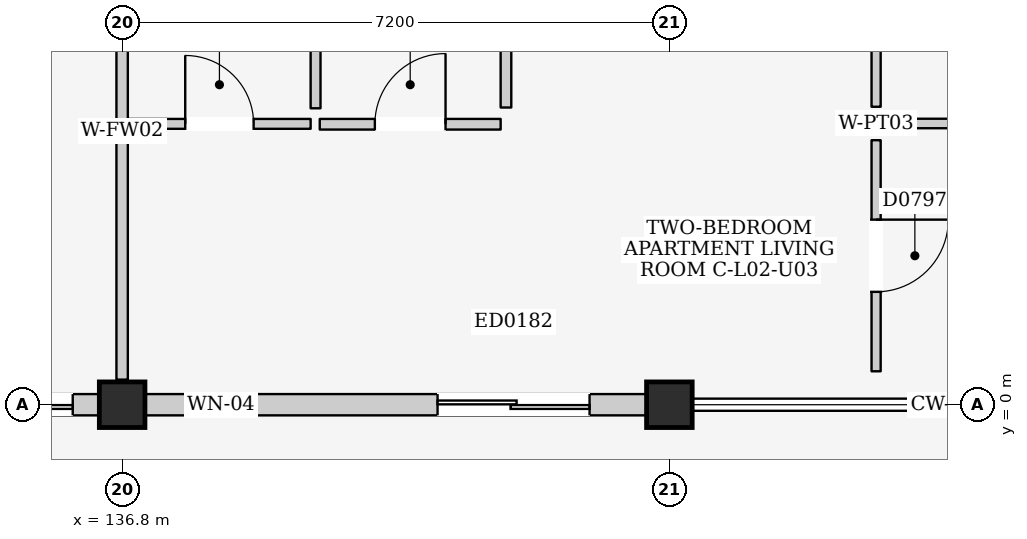
"""IFC4 building model, lengths in metres.
Left out: names, types, materials, properties, quantities, classifications, styles, units other than length and angle.
Written with IfcOpenShell. Run it as: python <this file> out.ifc"""

import sys

from ifc_helpers import new_model, si_unit, direction, frame, frame_2d, origin, origin_2d, place, context, subcontext, project, spatial, rectangle, extrude, element, fill, save


model = new_model("IFC4")
c1 = context("Model", 3, precision=1e-05, world=origin(), true_north=direction((0.0, 1.0)))
c2 = subcontext(c1, "Body", "Model", "MODEL_VIEW")
j1 = project(units=[si_unit("LENGTHUNIT", "METRE"), si_unit("PLANEANGLEUNIT", "RADIAN")], contexts=[c1])
p1 = place(None, origin())
s1 = spatial("IfcSite", under=j1, at=p1, CompositionType="ELEMENT")
p2 = place(p1, origin())
s2 = spatial("IfcBuilding", under=s1, at=p2, CompositionType="ELEMENT")
p3 = place(p2, frame((0.0, 0.0, 9.0)))
s3 = spatial("IfcBuildingStorey", under=s2, at=p3, CompositionType="ELEMENT", Elevation=9.0)
for number, where, z_axis, x_axis in (
    (1, (136.8, 0.0, 0.0), (0.0, 0.0, 1.0), (1.0, 0.0, 0.0)),
    (2, (144.0, 0.0, 0.0), (0.0, 0.0, 1.0), (1.0, 0.0, 0.0)),
):
    element("IfcColumn", number, at=place(p3, frame(where, z_axis=z_axis, x_axis=x_axis)), inside=s3, PredefinedType="COLUMN", context=c2, shape_type="SweptSolid", body=[
        extrude(rectangle(XDim=0.6, YDim=0.6, at=origin_2d()), origin(), (0.0, 0.0, 1.0), 3.2),
    ])
p4 = place(p3, frame((129.9, 0.0, 0.0), z_axis=(0.0, 0.0, 1.0), x_axis=(1.0, 0.0, 0.0)))
e3 = element("IfcWall", 3, at=p4, inside=s3, PredefinedType="ELEMENTEDWALL", context=c2, shape_type="SweptSolid", body=[
    extrude(rectangle(XDim=6.6, YDim=0.28, at=frame_2d((3.3, 0.0))), origin(), (0.0, 0.0, 1.0), 2.425),
])
p5 = place(p4, frame((3.85, 0.0, 0.0)))
e4 = element("IfcOpeningElement", 4, at=p5, cuts=e3, PredefinedType="OPENING", context=c2, shape_type="SweptSolid", body=[
    extrude(rectangle(XDim=2.4, YDim=2.12, at=frame_2d((1.2, 1.06))), frame((0.0, 0.155, 0.0), z_axis=(0.0, -1.0, 0.0), x_axis=(1.0, 0.0, 0.0)), (0.0, 0.0, 1.0), 0.31),
])
p6 = place(p4, frame((0.55, 0.0, 0.9)))
e5 = element("IfcOpeningElement", 5, at=p6, cuts=e3, PredefinedType="OPENING", context=c2, shape_type="SweptSolid", body=[
    extrude(rectangle(XDim=1.2, YDim=1.35, at=frame_2d((0.6, 0.675))), frame((0.0, 0.155, 0.0), z_axis=(0.0, -1.0, 0.0), x_axis=(1.0, 0.0, 0.0)), (0.0, 0.0, 1.0), 0.31),
])
p7 = place(p3, frame((137.1, 0.0, 0.0), z_axis=(0.0, 0.0, 1.0), x_axis=(1.0, 0.0, 0.0)))
e6 = element("IfcWall", 6, at=p7, inside=s3, PredefinedType="ELEMENTEDWALL", context=c2, shape_type="SweptSolid", body=[
    extrude(rectangle(XDim=6.6, YDim=0.28, at=frame_2d((3.3, 0.0))), origin(), (0.0, 0.0, 1.0), 2.425),
])
p8 = place(p7, frame((3.85, 0.0, 0.0)))
e7 = element("IfcOpeningElement", 7, at=p8, cuts=e6, PredefinedType="OPENING", context=c2, shape_type="SweptSolid", body=[
    extrude(rectangle(XDim=2.0, YDim=2.12, at=frame_2d((1.0, 1.06))), frame((0.0, 0.155, 0.0), z_axis=(0.0, -1.0, 0.0), x_axis=(1.0, 0.0, 0.0)), (0.0, 0.0, 1.0), 0.31),
])
p9 = place(p7, frame((0.55, 0.0, 0.9)))
e8 = element("IfcOpeningElement", 8, at=p9, cuts=e6, PredefinedType="OPENING", context=c2, shape_type="SweptSolid", body=[
    extrude(rectangle(XDim=0.9, YDim=1.1, at=frame_2d((0.45, 0.55))), frame((0.0, 0.155, 0.0), z_axis=(0.0, -1.0, 0.0), x_axis=(1.0, 0.0, 0.0)), (0.0, 0.0, 1.0), 0.31),
])
p10 = place(p3, frame((136.8, 0.33, 0.0), z_axis=(0.0, 0.0, 1.0), x_axis=(0.0, 1.0, 0.0)))
e9 = element("IfcWall", 9, at=p10, inside=s3, PredefinedType="PARTITIONING", context=c2, shape_type="SweptSolid", body=[
    extrude(rectangle(XDim=6.54, YDim=0.15, at=frame_2d((3.27, 0.0))), origin(), (0.0, 0.0, 1.0), 2.395),
])
p11 = place(p3, frame((136.88, 3.695, 0.0), z_axis=(0.0, 0.0, 1.0), x_axis=(1.0, 0.0, 0.0)))
e10 = element("IfcWall", 10, at=p11, inside=s3, PredefinedType="PARTITIONING", context=c2, shape_type="SweptSolid", body=[
    extrude(rectangle(XDim=2.4, YDim=0.13, at=frame_2d((1.2, 0.0))), origin(), (0.0, 0.0, 1.0), 2.96),
])
p12 = place(p11, frame((0.75, 0.0, 0.0)))
e11 = element("IfcOpeningElement", 11, at=p12, cuts=e10, PredefinedType="OPENING", context=c2, shape_type="SweptSolid", body=[
    extrude(rectangle(XDim=0.9, YDim=2.1, at=frame_2d((0.45, 1.05))), frame((0.0, 0.08, 0.0), z_axis=(0.0, -1.0, 0.0), x_axis=(1.0, 0.0, 0.0)), (0.0, 0.0, 1.0), 0.16),
])
p13 = place(p3, frame((139.345, 3.9, 0.0), z_axis=(0.0, 0.0, 1.0), x_axis=(0.0, 1.0, 0.0)))
e12 = element("IfcWall", 12, at=p13, inside=s3, PredefinedType="PARTITIONING", context=c2, shape_type="SweptSolid", body=[
    extrude(rectangle(XDim=3.04, YDim=0.13, at=frame_2d((1.52, 0.0))), origin(), (0.0, 0.0, 1.0), 2.96),
])
p14 = place(p3, frame((139.4, 3.69, 0.0), z_axis=(0.0, 0.0, 1.0), x_axis=(1.0, 0.0, 0.0)))
e13 = element("IfcWall", 13, at=p14, inside=s3, PredefinedType="PARTITIONING", context=c2, shape_type="SweptSolid", body=[
    extrude(rectangle(XDim=2.38, YDim=0.14, at=frame_2d((1.19, 0.0))), origin(), (0.0, 0.0, 1.0), 2.96),
])
p15 = place(p14, frame((0.725, 0.0, 0.0)))
e14 = element("IfcOpeningElement", 14, at=p15, cuts=e13, PredefinedType="OPENING", context=c2, shape_type="SweptSolid", body=[
    extrude(rectangle(XDim=0.93, YDim=2.14, at=frame_2d((0.465, 1.07))), frame((0.0, 0.085, 0.0), z_axis=(0.0, -1.0, 0.0), x_axis=(1.0, 0.0, 0.0)), (0.0, 0.0, 1.0), 0.17),
])
p16 = place(p3, frame((141.85, 3.91, 0.0), z_axis=(0.0, 0.0, 1.0), x_axis=(0.0, 1.0, 0.0)))
e15 = element("IfcWall", 15, at=p16, inside=s3, PredefinedType="PARTITIONING", context=c2, shape_type="SweptSolid", body=[
    extrude(rectangle(XDim=3.06, YDim=0.14, at=frame_2d((1.53, 0.0))), origin(), (0.0, 0.0, 1.0), 2.96),
])
p17 = place(p3, frame((146.72, 0.44, 0.0), z_axis=(0.0, 0.0, 1.0), x_axis=(0.0, 1.0, 0.0)))
e16 = element("IfcWall", 16, at=p17, inside=s3, PredefinedType="PARTITIONING", context=c2, shape_type="SweptSolid", body=[
    extrude(rectangle(XDim=3.04, YDim=0.12, at=frame_2d((1.52, 0.0))), origin(), (0.0, 0.0, 1.0), 2.96),
])
p18 = place(p17, frame((1.045, 0.0, 0.0)))
e17 = element("IfcOpeningElement", 17, at=p18, cuts=e16, PredefinedType="OPENING", context=c2, shape_type="SweptSolid", body=[
    extrude(rectangle(XDim=0.95, YDim=2.15, at=frame_2d((0.475, 1.075))), frame((0.0, 0.075, 0.0), z_axis=(0.0, -1.0, 0.0), x_axis=(1.0, 0.0, 0.0)), (0.0, 0.0, 1.0), 0.15),
])
p19 = place(p3, frame((146.92, 3.7, 0.0), z_axis=(0.0, 0.0, 1.0), x_axis=(1.0, 0.0, 0.0)))
e18 = element("IfcWall", 18, at=p19, inside=s3, PredefinedType="PARTITIONING", context=c2, shape_type="SweptSolid", body=[
    extrude(rectangle(XDim=4.06, YDim=0.125, at=frame_2d((2.03, 0.0))), origin(), (0.0, 0.0, 1.0), 2.96),
])
p20 = place(p3, frame((146.72, 3.92, 0.0), z_axis=(0.0, 0.0, 1.0), x_axis=(0.0, 1.0, 0.0)))
e19 = element("IfcWall", 19, at=p20, inside=s3, PredefinedType="PARTITIONING", context=c2, shape_type="SweptSolid", body=[
    extrude(rectangle(XDim=3.04, YDim=0.12, at=frame_2d((1.52, 0.0))), origin(), (0.0, 0.0, 1.0), 2.96),
])
p21 = place(p20, frame((1.04, 0.0, 0.0)))
e20 = element("IfcOpeningElement", 20, at=p21, cuts=e19, PredefinedType="OPENING", context=c2, shape_type="SweptSolid", body=[
    extrude(rectangle(XDim=0.96, YDim=2.15, at=frame_2d((0.48, 1.075))), frame((0.0, 0.075, 0.0), z_axis=(0.0, -1.0, 0.0), x_axis=(1.0, 0.0, 0.0)), (0.0, 0.0, 1.0), 0.15),
])
p22 = place(p5, frame((2.4, 0.0, 0.0), z_axis=(0.0, 0.0, 1.0), x_axis=(-1.0, 0.0, 0.0)))
e21 = element("IfcDoor", 21, at=p22, inside=s3, OperationType="DOUBLE_DOOR_SLIDING", PredefinedType="DOOR", context=c2, shape_type="SweptSolid", body=[
    extrude(rectangle(XDim=2.4, YDim=2.12, at=frame_2d((1.2, 1.06))), frame((0.0, 0.025, 0.0), z_axis=(0.0, -1.0, 0.0), x_axis=(1.0, 0.0, 0.0)), (0.0, 0.0, 1.0), 0.05),
])
fill(e4, e21)
p23 = place(p8, frame((2.0, 0.0, 0.0), z_axis=(0.0, 0.0, 1.0), x_axis=(-1.0, 0.0, 0.0)))
e22 = element("IfcDoor", 22, at=p23, inside=s3, OperationType="DOUBLE_DOOR_SLIDING", PredefinedType="DOOR", context=c2, shape_type="SweptSolid", body=[
    extrude(rectangle(XDim=2.0, YDim=2.12, at=frame_2d((1.0, 1.06))), frame((0.0, 0.025, 0.0), z_axis=(0.0, -1.0, 0.0), x_axis=(1.0, 0.0, 0.0)), (0.0, 0.0, 1.0), 0.05),
])
fill(e7, e22)
p24 = place(p9, origin())
e23 = element("IfcWindow", 23, at=p24, inside=s3, PartitioningType="SINGLE_PANEL", PredefinedType="WINDOW", context=c2, shape_type="SweptSolid", body=[
    extrude(rectangle(XDim=0.9, YDim=1.1, at=frame_2d((0.45, 0.55))), frame((0.0, 0.03, 0.0), z_axis=(0.0, -1.0, 0.0), x_axis=(1.0, 0.0, 0.0)), (0.0, 0.0, 1.0), 0.06),
])
fill(e8, e23)
p25 = place(p12, origin())
e24 = element("IfcDoor", 24, at=p25, inside=s3, OperationType="SINGLE_SWING_LEFT", PredefinedType="DOOR", context=c2, shape_type="SweptSolid", body=[
    extrude(rectangle(XDim=0.9, YDim=2.1, at=frame_2d((0.45, 1.05))), frame((0.0, 0.025, 0.0), z_axis=(0.0, -1.0, 0.0), x_axis=(1.0, 0.0, 0.0)), (0.0, 0.0, 1.0), 0.05),
])
fill(e11, e24)
p26 = place(p15, origin())
e25 = element("IfcDoor", 25, at=p26, inside=s3, OperationType="SINGLE_SWING_RIGHT", PredefinedType="DOOR", context=c2, shape_type="SweptSolid", body=[
    extrude(rectangle(XDim=0.93, YDim=2.14, at=frame_2d((0.465, 1.07))), frame((0.0, 0.025, 0.0), z_axis=(0.0, -1.0, 0.0), x_axis=(1.0, 0.0, 0.0)), (0.0, 0.0, 1.0), 0.05),
])
fill(e14, e25)
p27 = place(p18, frame((0.95, 0.0, 0.0), z_axis=(0.0, 0.0, 1.0), x_axis=(-1.0, 0.0, 0.0)))
e26 = element("IfcDoor", 26, at=p27, inside=s3, OperationType="SINGLE_SWING_LEFT", PredefinedType="DOOR", context=c2, shape_type="SweptSolid", body=[
    extrude(rectangle(XDim=0.95, YDim=2.15, at=frame_2d((0.475, 1.075))), frame((0.0, 0.025, 0.0), z_axis=(0.0, -1.0, 0.0), x_axis=(1.0, 0.0, 0.0)), (0.0, 0.0, 1.0), 0.05),
])
fill(e17, e26)
save(model, sys.argv[1])
